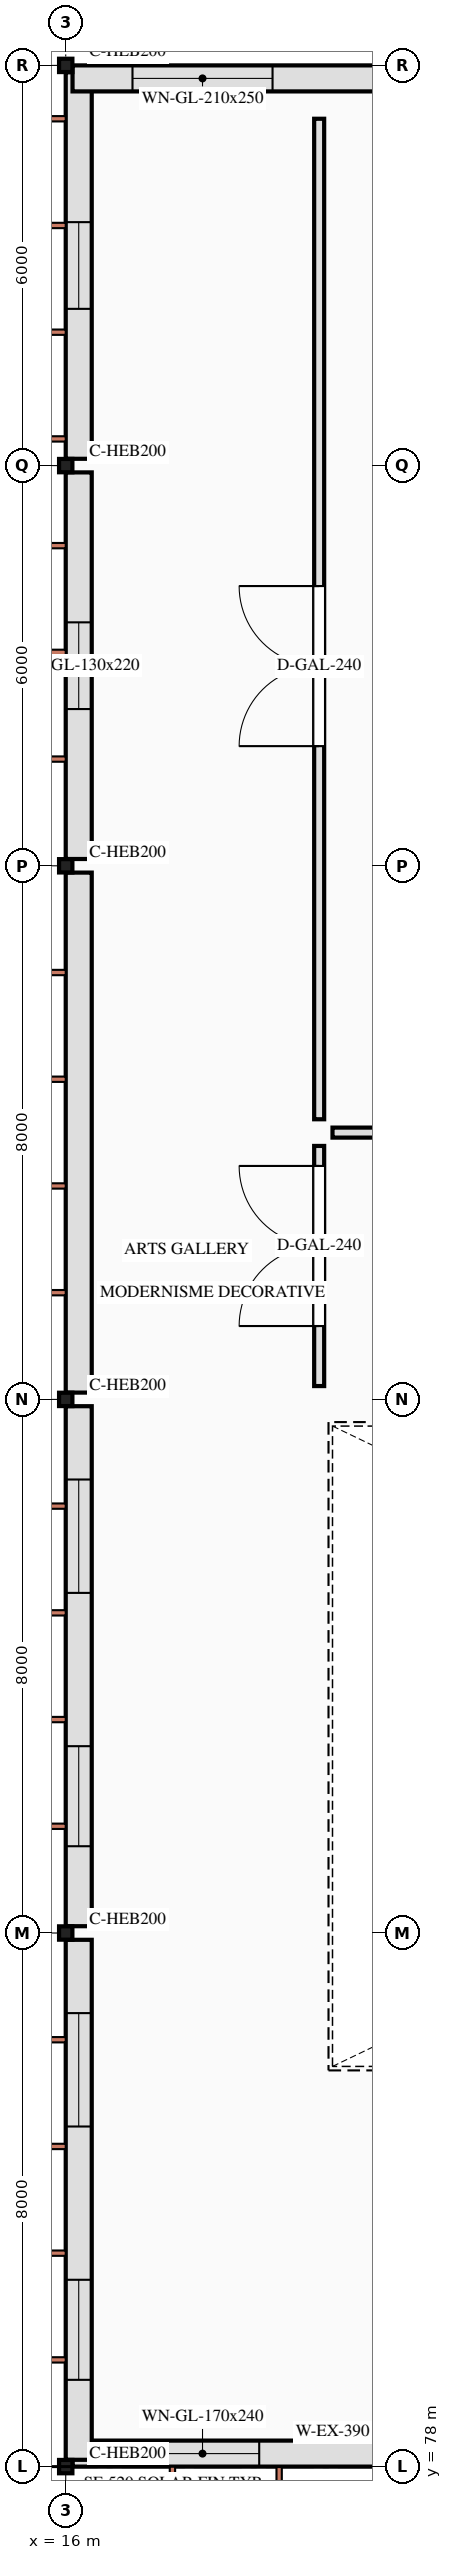
"""IFC4 building model, lengths in metres.
Left out: names, types, materials, properties, quantities, classifications, styles, units other than length and angle.
Written with IfcOpenShell. Run it as: python <this file> out.ifc"""

import sys

from ifc_helpers import new_model, si_unit, direction, frame, frame_2d, origin, origin_2d, place, context, subcontext, project, spatial, rectangle, i_section, extrude, element, fill, save


model = new_model("IFC4")
c1 = context("Model", 3, precision=1e-05, world=origin(), true_north=direction((0.0, 1.0)))
c2 = subcontext(c1, "Body", "Model", "MODEL_VIEW")
j1 = project(units=[si_unit("LENGTHUNIT", "METRE"), si_unit("PLANEANGLEUNIT", "RADIAN")], contexts=[c1])
p1 = place(None, origin())
s1 = spatial("IfcSite", under=j1, at=p1, CompositionType="ELEMENT")
p2 = place(p1, origin())
s2 = spatial("IfcBuilding", under=s1, at=p2, CompositionType="ELEMENT")
p3 = place(p2, frame((0.0, 0.0, 21.8)))
s3 = spatial("IfcBuildingStorey", under=s2, at=p3, CompositionType="ELEMENT", Elevation=21.8)
for number, where, z_axis, x_axis in (
    (1, (16.0, 78.0, 0.0), (0.0, 0.0, 1.0), (1.0, 0.0, 0.0)),
    (2, (16.0, 86.0, 0.0), (0.0, 0.0, 1.0), (1.0, 0.0, 0.0)),
    (3, (16.0, 94.0, 0.0), (0.0, 0.0, 1.0), (1.0, 0.0, 0.0)),
    (4, (16.0, 102.0, 0.0), (0.0, 0.0, 1.0), (1.0, 0.0, 0.0)),
    (5, (16.0, 108.0, 0.0), (0.0, 0.0, 1.0), (1.0, 0.0, 0.0)),
    (6, (16.0, 114.0, 0.0), (0.0, 0.0, 1.0), (1.0, 0.0, 0.0)),
):
    element("IfcColumn", number, at=place(p3, frame(where, z_axis=z_axis, x_axis=x_axis)), inside=s3, PredefinedType="COLUMN", context=c2, shape_type="SweptSolid", body=[
        extrude(i_section(OverallWidth=0.2, OverallDepth=0.2, WebThickness=0.009, FlangeThickness=0.015, FilletRadius=0.018, at=origin_2d()), origin(), (0.0, 0.0, 1.0), 4.2),
    ])
p4 = place(p3, frame((23.898, 78.195, 0.0), z_axis=(0.0, 0.0, 1.0), x_axis=(-1.0, 0.0, 0.0)))
e7 = element("IfcWall", 7, at=p4, inside=s3, PredefinedType="SOLIDWALL", context=c2, shape_type="SweptSolid", body=[
    extrude(rectangle(XDim=7.796, YDim=0.39, at=frame_2d((3.898, 0.0))), origin(), (0.0, 0.0, 1.0), 3.92),
])
p5 = place(p4, frame((1.199, 0.0, 0.85)))
e8 = element("IfcOpeningElement", 8, at=p5, cuts=e7, PredefinedType="OPENING", context=c2, shape_type="SweptSolid", body=[
    extrude(rectangle(XDim=1.5, YDim=2.4, at=frame_2d((0.75, 1.2))), frame((0.0, 0.205, 0.0), z_axis=(0.0, -1.0, 0.0), x_axis=(1.0, 0.0, 0.0)), (0.0, 0.0, 1.0), 0.41),
])
p6 = place(p4, frame((4.997, 0.0, 0.85)))
e9 = element("IfcOpeningElement", 9, at=p6, cuts=e7, PredefinedType="OPENING", context=c2, shape_type="SweptSolid", body=[
    extrude(rectangle(XDim=1.7, YDim=2.4, at=frame_2d((0.85, 1.2))), frame((0.0, 0.205, 0.0), z_axis=(0.0, -1.0, 0.0), x_axis=(1.0, 0.0, 0.0)), (0.0, 0.0, 1.0), 0.41),
])
p7 = place(p3, frame((16.195, 78.102, 0.0), z_axis=(0.0, 0.0, 1.0), x_axis=(0.0, 1.0, 0.0)))
e10 = element("IfcWall", 10, at=p7, inside=s3, PredefinedType="SOLIDWALL", context=c2, shape_type="SweptSolid", body=[
    extrude(rectangle(XDim=7.796, YDim=0.39, at=frame_2d((3.898, 0.0))), origin(), (0.0, 0.0, 1.0), 3.92),
])
p8 = place(p7, frame((1.199, 0.0, 0.85)))
e11 = element("IfcOpeningElement", 11, at=p8, cuts=e10, PredefinedType="OPENING", context=c2, shape_type="SweptSolid", body=[
    extrude(rectangle(XDim=1.5, YDim=2.4, at=frame_2d((0.75, 1.2))), frame((0.0, 0.205, 0.0), z_axis=(0.0, -1.0, 0.0), x_axis=(1.0, 0.0, 0.0)), (0.0, 0.0, 1.0), 0.41),
])
p9 = place(p7, frame((4.997, 0.0, 0.85)))
e12 = element("IfcOpeningElement", 12, at=p9, cuts=e10, PredefinedType="OPENING", context=c2, shape_type="SweptSolid", body=[
    extrude(rectangle(XDim=1.7, YDim=2.4, at=frame_2d((0.85, 1.2))), frame((0.0, 0.205, 0.0), z_axis=(0.0, -1.0, 0.0), x_axis=(1.0, 0.0, 0.0)), (0.0, 0.0, 1.0), 0.41),
])
p10 = place(p3, frame((16.195, 86.102, 0.0), z_axis=(0.0, 0.0, 1.0), x_axis=(0.0, 1.0, 0.0)))
e13 = element("IfcWall", 13, at=p10, inside=s3, PredefinedType="SOLIDWALL", context=c2, shape_type="SweptSolid", body=[
    extrude(rectangle(XDim=7.796, YDim=0.39, at=frame_2d((3.898, 0.0))), origin(), (0.0, 0.0, 1.0), 3.92),
])
p11 = place(p10, frame((1.199, 0.0, 0.85)))
e14 = element("IfcOpeningElement", 14, at=p11, cuts=e13, PredefinedType="OPENING", context=c2, shape_type="SweptSolid", body=[
    extrude(rectangle(XDim=1.5, YDim=2.4, at=frame_2d((0.75, 1.2))), frame((0.0, 0.205, 0.0), z_axis=(0.0, -1.0, 0.0), x_axis=(1.0, 0.0, 0.0)), (0.0, 0.0, 1.0), 0.41),
])
p12 = place(p10, frame((4.997, 0.0, 0.85)))
e15 = element("IfcOpeningElement", 15, at=p12, cuts=e13, PredefinedType="OPENING", context=c2, shape_type="SweptSolid", body=[
    extrude(rectangle(XDim=1.7, YDim=2.4, at=frame_2d((0.85, 1.2))), frame((0.0, 0.205, 0.0), z_axis=(0.0, -1.0, 0.0), x_axis=(1.0, 0.0, 0.0)), (0.0, 0.0, 1.0), 0.41),
])
p13 = place(p3, frame((16.195, 94.102, 0.0), z_axis=(0.0, 0.0, 1.0), x_axis=(0.0, 1.0, 0.0)))
e16 = element("IfcWall", 16, at=p13, inside=s3, PredefinedType="SOLIDWALL", context=c2, shape_type="SweptSolid", body=[
    extrude(rectangle(XDim=7.796, YDim=0.39, at=frame_2d((3.898, 0.0))), origin(), (0.0, 0.0, 1.0), 3.92),
])
p14 = place(p3, frame((16.195, 102.102, 0.0), z_axis=(0.0, 0.0, 1.0), x_axis=(0.0, 1.0, 0.0)))
e17 = element("IfcWall", 17, at=p14, inside=s3, PredefinedType="SOLIDWALL", context=c2, shape_type="SweptSolid", body=[
    extrude(rectangle(XDim=5.796, YDim=0.39, at=frame_2d((2.898, 0.0))), origin(), (0.0, 0.0, 1.0), 3.92),
])
p15 = place(p14, frame((2.248, 0.0, 0.85)))
e18 = element("IfcOpeningElement", 18, at=p15, cuts=e17, PredefinedType="OPENING", context=c2, shape_type="SweptSolid", body=[
    extrude(rectangle(XDim=1.3, YDim=2.2, at=frame_2d((0.65, 1.1))), frame((0.0, 0.205, 0.0), z_axis=(0.0, -1.0, 0.0), x_axis=(1.0, 0.0, 0.0)), (0.0, 0.0, 1.0), 0.41),
])
p16 = place(p3, frame((16.195, 108.102, 0.0), z_axis=(0.0, 0.0, 1.0), x_axis=(0.0, 1.0, 0.0)))
e19 = element("IfcWall", 19, at=p16, inside=s3, PredefinedType="SOLIDWALL", context=c2, shape_type="SweptSolid", body=[
    extrude(rectangle(XDim=5.796, YDim=0.39, at=frame_2d((2.898, 0.0))), origin(), (0.0, 0.0, 1.0), 3.92),
])
p17 = place(p16, frame((2.248, 0.0, 0.85)))
e20 = element("IfcOpeningElement", 20, at=p17, cuts=e19, PredefinedType="OPENING", context=c2, shape_type="SweptSolid", body=[
    extrude(rectangle(XDim=1.3, YDim=2.2, at=frame_2d((0.65, 1.1))), frame((0.0, 0.205, 0.0), z_axis=(0.0, -1.0, 0.0), x_axis=(1.0, 0.0, 0.0)), (0.0, 0.0, 1.0), 0.41),
])
p18 = place(p3, frame((16.102, 113.805, 0.0), z_axis=(0.0, 0.0, 1.0), x_axis=(1.0, 0.0, 0.0)))
e21 = element("IfcWall", 21, at=p18, inside=s3, PredefinedType="SOLIDWALL", context=c2, shape_type="SweptSolid", body=[
    extrude(rectangle(XDim=7.796, YDim=0.39, at=frame_2d((3.898, 0.0))), origin(), (0.0, 0.0, 1.0), 3.92),
])
p19 = place(p18, frame((0.899, 0.0, 0.85)))
e22 = element("IfcOpeningElement", 22, at=p19, cuts=e21, PredefinedType="OPENING", context=c2, shape_type="SweptSolid", body=[
    extrude(rectangle(XDim=2.1, YDim=2.5, at=frame_2d((1.05, 1.25))), frame((0.0, 0.205, 0.0), z_axis=(0.0, -1.0, 0.0), x_axis=(1.0, 0.0, 0.0)), (0.0, 0.0, 1.0), 0.41),
])
p20 = place(p18, frame((4.647, 0.0, 0.85)))
e23 = element("IfcOpeningElement", 23, at=p20, cuts=e21, PredefinedType="OPENING", context=c2, shape_type="SweptSolid", body=[
    extrude(rectangle(XDim=2.4, YDim=2.6, at=frame_2d((1.2, 1.3))), frame((0.0, 0.205, 0.0), z_axis=(0.0, -1.0, 0.0), x_axis=(1.0, 0.0, 0.0)), (0.0, 0.0, 1.0), 0.41),
])
p21 = place(p3, frame((19.8, 94.2, 0.0), z_axis=(0.0, 0.0, 1.0), x_axis=(0.0, 1.0, 0.0)))
e24 = element("IfcWall", 24, at=p21, inside=s3, PredefinedType="PARTITIONING", context=c2, shape_type="SweptSolid", body=[
    extrude(rectangle(XDim=3.6, YDim=0.15, at=frame_2d((1.8, 0.0))), origin(), (0.0, 0.0, 1.0), 3.92),
])
p22 = place(p21, frame((0.9, 0.0, 0.0)))
e25 = element("IfcOpeningElement", 25, at=p22, cuts=e24, PredefinedType="OPENING", context=c2, shape_type="SweptSolid", body=[
    extrude(rectangle(XDim=2.4, YDim=2.75, at=frame_2d((1.2, 1.375))), frame((0.0, 0.085, 0.0), z_axis=(0.0, -1.0, 0.0), x_axis=(1.0, 0.0, 0.0)), (0.0, 0.0, 1.0), 0.17),
])
p23 = place(p3, frame((20.0, 98.0, 0.0), z_axis=(0.0, 0.0, 1.0), x_axis=(1.0, 0.0, 0.0)))
e26 = element("IfcWall", 26, at=p23, inside=s3, PredefinedType="PARTITIONING", context=c2, shape_type="SweptSolid", body=[
    extrude(rectangle(XDim=20.8, YDim=0.15, at=frame_2d((10.4, 0.0))), origin(), (0.0, 0.0, 1.0), 3.92),
])
p24 = place(p23, frame((7.043, 0.0, 0.0)))
e27 = element("IfcOpeningElement", 27, at=p24, cuts=e26, PredefinedType="OPENING", context=c2, shape_type="SweptSolid", body=[
    extrude(rectangle(XDim=2.1, YDim=2.6, at=frame_2d((1.05, 1.3))), frame((0.0, 0.085, 0.0), z_axis=(0.0, -1.0, 0.0), x_axis=(1.0, 0.0, 0.0)), (0.0, 0.0, 1.0), 0.17),
])
p25 = place(p3, frame((19.8, 98.2, 0.0), z_axis=(0.0, 0.0, 1.0), x_axis=(0.0, 1.0, 0.0)))
e28 = element("IfcWall", 28, at=p25, inside=s3, PredefinedType="PARTITIONING", context=c2, shape_type="SweptSolid", body=[
    extrude(rectangle(XDim=15.0, YDim=0.15, at=frame_2d((7.5, 0.0))), origin(), (0.0, 0.0, 1.0), 3.92),
])
p26 = place(p25, frame((5.594, 0.0, 0.0)))
e29 = element("IfcOpeningElement", 29, at=p26, cuts=e28, PredefinedType="OPENING", context=c2, shape_type="SweptSolid", body=[
    extrude(rectangle(XDim=2.4, YDim=2.75, at=frame_2d((1.2, 1.375))), frame((0.0, 0.085, 0.0), z_axis=(0.0, -1.0, 0.0), x_axis=(1.0, 0.0, 0.0)), (0.0, 0.0, 1.0), 0.17),
])
p27 = place(p6, origin())
e30 = element("IfcWindow", 30, at=p27, inside=s3, PartitioningType="DOUBLE_PANEL_VERTICAL", PredefinedType="WINDOW", context=c2, shape_type="SweptSolid", body=[
    extrude(rectangle(XDim=1.7, YDim=2.4, at=frame_2d((0.85, 1.2))), frame((0.0, 0.03, 0.0), z_axis=(0.0, -1.0, 0.0), x_axis=(1.0, 0.0, 0.0)), (0.0, 0.0, 1.0), 0.06),
])
fill(e9, e30)
p28 = place(p8, origin())
e31 = element("IfcWindow", 31, at=p28, inside=s3, PartitioningType="SINGLE_PANEL", PredefinedType="WINDOW", context=c2, shape_type="SweptSolid", body=[
    extrude(rectangle(XDim=1.5, YDim=2.4, at=frame_2d((0.75, 1.2))), frame((0.0, 0.03, 0.0), z_axis=(0.0, -1.0, 0.0), x_axis=(1.0, 0.0, 0.0)), (0.0, 0.0, 1.0), 0.06),
])
fill(e11, e31)
p29 = place(p9, origin())
e32 = element("IfcWindow", 32, at=p29, inside=s3, PartitioningType="DOUBLE_PANEL_VERTICAL", PredefinedType="WINDOW", context=c2, shape_type="SweptSolid", body=[
    extrude(rectangle(XDim=1.7, YDim=2.4, at=frame_2d((0.85, 1.2))), frame((0.0, 0.03, 0.0), z_axis=(0.0, -1.0, 0.0), x_axis=(1.0, 0.0, 0.0)), (0.0, 0.0, 1.0), 0.06),
])
fill(e12, e32)
p30 = place(p11, origin())
e33 = element("IfcWindow", 33, at=p30, inside=s3, PartitioningType="SINGLE_PANEL", PredefinedType="WINDOW", context=c2, shape_type="SweptSolid", body=[
    extrude(rectangle(XDim=1.5, YDim=2.4, at=frame_2d((0.75, 1.2))), frame((0.0, 0.03, 0.0), z_axis=(0.0, -1.0, 0.0), x_axis=(1.0, 0.0, 0.0)), (0.0, 0.0, 1.0), 0.06),
])
fill(e14, e33)
p31 = place(p12, origin())
e34 = element("IfcWindow", 34, at=p31, inside=s3, PartitioningType="DOUBLE_PANEL_VERTICAL", PredefinedType="WINDOW", context=c2, shape_type="SweptSolid", body=[
    extrude(rectangle(XDim=1.7, YDim=2.4, at=frame_2d((0.85, 1.2))), frame((0.0, 0.03, 0.0), z_axis=(0.0, -1.0, 0.0), x_axis=(1.0, 0.0, 0.0)), (0.0, 0.0, 1.0), 0.06),
])
fill(e15, e34)
p32 = place(p15, origin())
e35 = element("IfcWindow", 35, at=p32, inside=s3, PartitioningType="SINGLE_PANEL", PredefinedType="WINDOW", context=c2, shape_type="SweptSolid", body=[
    extrude(rectangle(XDim=1.3, YDim=2.2, at=frame_2d((0.65, 1.1))), frame((0.0, 0.03, 0.0), z_axis=(0.0, -1.0, 0.0), x_axis=(1.0, 0.0, 0.0)), (0.0, 0.0, 1.0), 0.06),
])
fill(e18, e35)
p33 = place(p17, origin())
e36 = element("IfcWindow", 36, at=p33, inside=s3, PartitioningType="SINGLE_PANEL", PredefinedType="WINDOW", context=c2, shape_type="SweptSolid", body=[
    extrude(rectangle(XDim=1.3, YDim=2.2, at=frame_2d((0.65, 1.1))), frame((0.0, 0.03, 0.0), z_axis=(0.0, -1.0, 0.0), x_axis=(1.0, 0.0, 0.0)), (0.0, 0.0, 1.0), 0.06),
])
fill(e20, e36)
p34 = place(p19, origin())
e37 = element("IfcWindow", 37, at=p34, inside=s3, PartitioningType="DOUBLE_PANEL_VERTICAL", PredefinedType="WINDOW", context=c2, shape_type="SweptSolid", body=[
    extrude(rectangle(XDim=2.1, YDim=2.5, at=frame_2d((1.05, 1.25))), frame((0.0, 0.03, 0.0), z_axis=(0.0, -1.0, 0.0), x_axis=(1.0, 0.0, 0.0)), (0.0, 0.0, 1.0), 0.06),
])
fill(e22, e37)
p35 = place(p22, origin())
e38 = element("IfcDoor", 38, at=p35, inside=s3, OperationType="DOUBLE_DOOR_DOUBLE_SWING", PredefinedType="DOOR", context=c2, shape_type="SweptSolid", body=[
    extrude(rectangle(XDim=2.4, YDim=2.75, at=frame_2d((1.2, 1.375))), frame((0.0, 0.025, 0.0), z_axis=(0.0, -1.0, 0.0), x_axis=(1.0, 0.0, 0.0)), (0.0, 0.0, 1.0), 0.05),
])
fill(e25, e38)
p36 = place(p26, origin())
e39 = element("IfcDoor", 39, at=p36, inside=s3, OperationType="DOUBLE_DOOR_DOUBLE_SWING", PredefinedType="DOOR", context=c2, shape_type="SweptSolid", body=[
    extrude(rectangle(XDim=2.4, YDim=2.75, at=frame_2d((1.2, 1.375))), frame((0.0, 0.025, 0.0), z_axis=(0.0, -1.0, 0.0), x_axis=(1.0, 0.0, 0.0)), (0.0, 0.0, 1.0), 0.05),
])
fill(e29, e39)
save(model, sys.argv[1])
